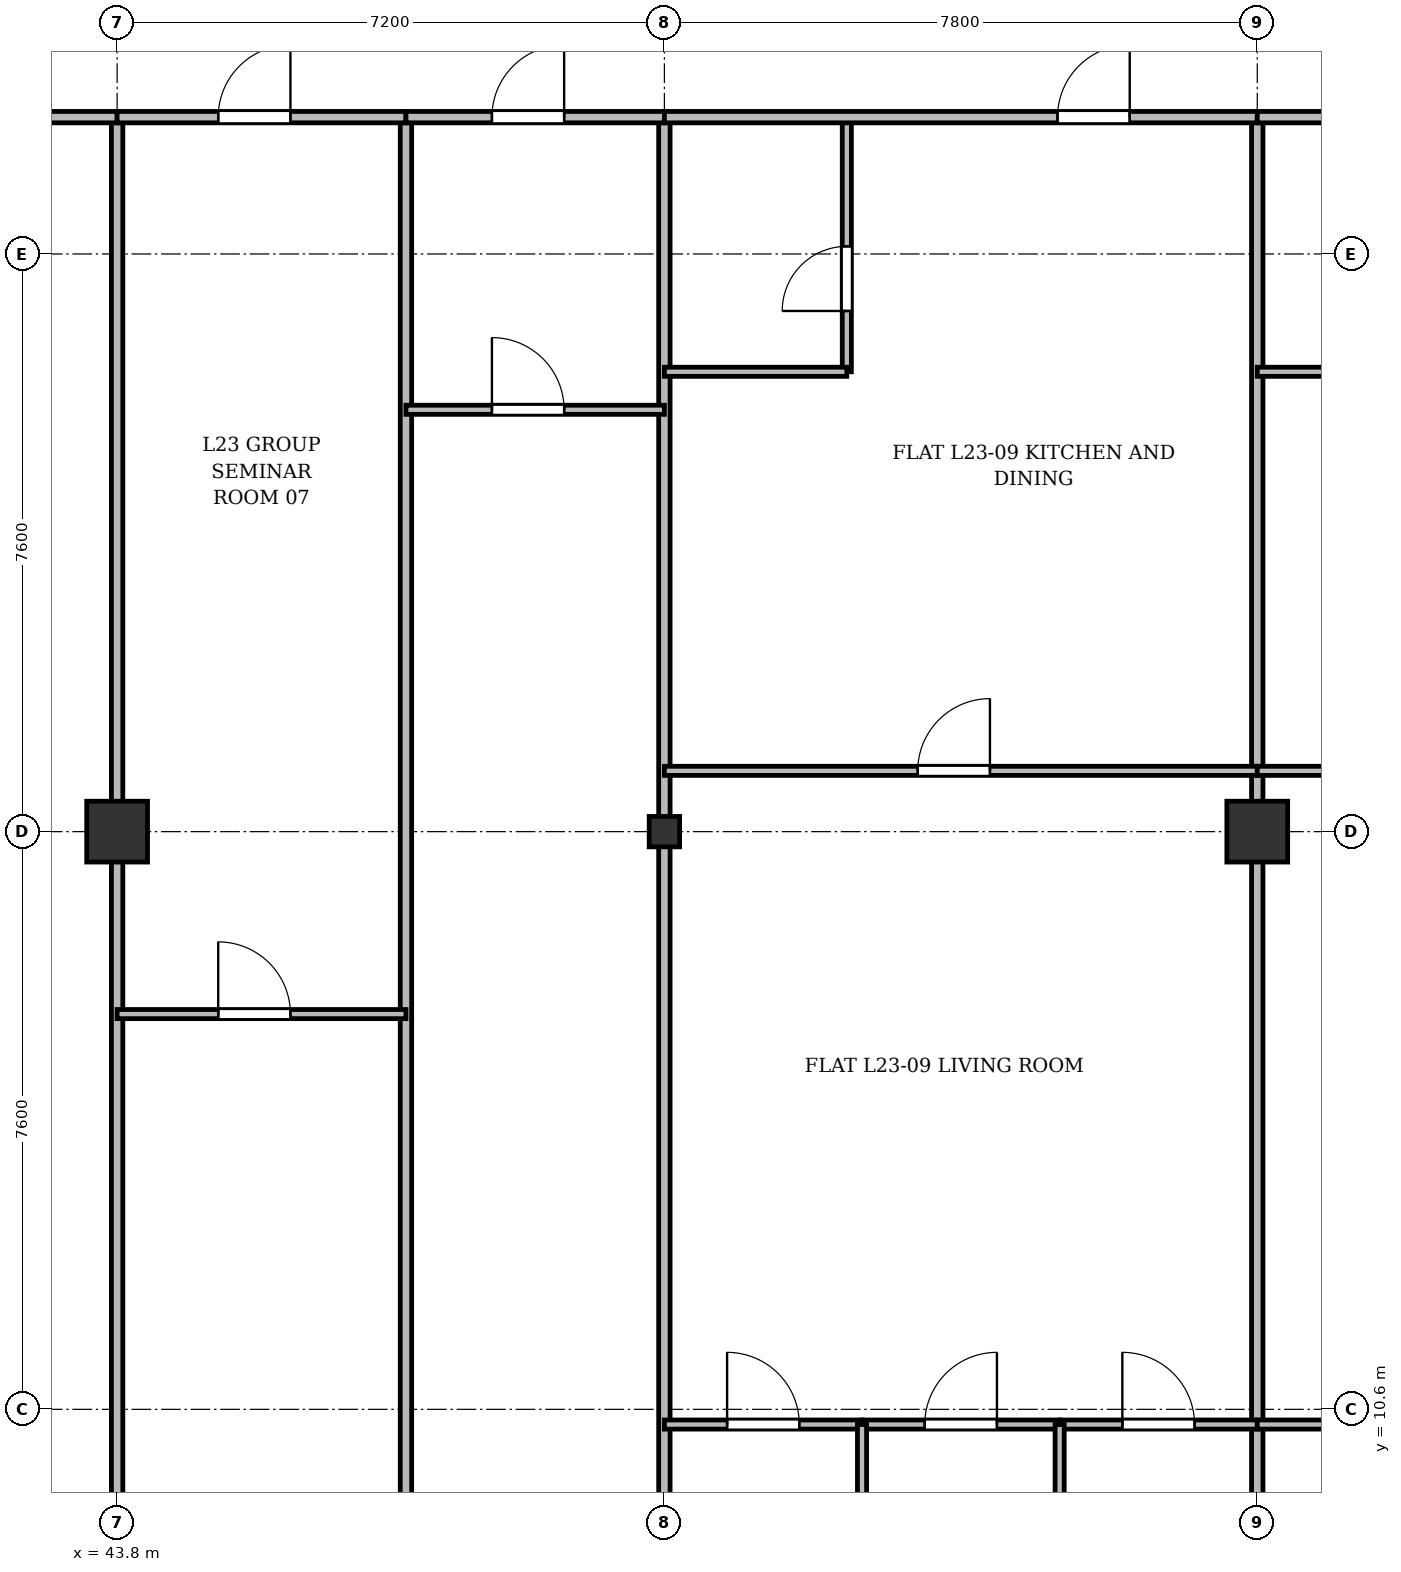
"""IFC4 building model, lengths in metres.
Left out: names, types, materials, properties, quantities, classifications, styles, units other than length and angle.
Written with IfcOpenShell. Run it as: python <this file> out.ifc"""

import sys

from ifc_helpers import new_model, si_unit, direction, frame, frame_2d, origin, origin_2d, place, context, subcontext, project, spatial, rectangle, i_section, extrude, source, transform, mapped, element, fill, save


model = new_model("IFC4")
c1 = context("Model", 3, precision=1e-05, world=origin(), true_north=direction((0.0, 1.0)))
c2 = subcontext(c1, "Body", "Model", "MODEL_VIEW")
j1 = project(units=[si_unit("LENGTHUNIT", "METRE"), si_unit("PLANEANGLEUNIT", "RADIAN")], contexts=[c1])
p1 = place(None, origin())
s1 = spatial("IfcSite", under=j1, at=p1, CompositionType="ELEMENT")
p2 = place(p1, origin())
s2 = spatial("IfcBuilding", under=s1, at=p2, CompositionType="ELEMENT")
p3 = place(p2, frame((0.0, 0.0, 92.5)))
s3 = spatial("IfcBuildingStorey", under=s2, at=p3, CompositionType="ELEMENT", Elevation=92.5)
m1 = source(origin(), c2, "Body", "SweptSolid", [
    extrude(rectangle(XDim=0.8, YDim=0.8, at=origin_2d()), origin(), (0.0, 0.0, 1.0), 3.6),
])
p4 = place(p3, frame((43.8, 18.2, 0.0), z_axis=(0.0, 0.0, 1.0), x_axis=(1.0, 0.0, 0.0)))
e1 = element("IfcColumn", 1, at=p4, inside=s3, PredefinedType="COLUMN", context=c2, shape_type="MappedRepresentation", body=[
    mapped(m1, transform((0.0, 0.0, 0.0), x_axis=(1.0, 0.0, 0.0), y_axis=(0.0, 1.0, 0.0), z_axis=(0.0, 0.0, 1.0), scale=1.0)),
])
m2 = source(origin(), c2, "Body", "SweptSolid", [
    extrude(i_section(OverallWidth=0.4, OverallDepth=0.4, WebThickness=0.022, FlangeThickness=0.035, at=origin_2d()), origin(), (0.0, 0.0, 1.0), 3.6),
])
p5 = place(p3, frame((51.0, 18.2, 0.0), z_axis=(0.0, 0.0, 1.0), x_axis=(1.0, 0.0, 0.0)))
e2 = element("IfcColumn", 2, at=p5, inside=s3, PredefinedType="COLUMN", context=c2, shape_type="MappedRepresentation", body=[
    mapped(m2, transform((0.0, 0.0, 0.0), x_axis=(1.0, 0.0, 0.0), y_axis=(0.0, 1.0, 0.0), z_axis=(0.0, 0.0, 1.0), scale=1.0)),
])
p6 = place(p3, frame((58.8, 18.2, 0.0), z_axis=(0.0, 0.0, 1.0), x_axis=(1.0, 0.0, 0.0)))
e3 = element("IfcColumn", 3, at=p6, inside=s3, PredefinedType="COLUMN", context=c2, shape_type="MappedRepresentation", body=[
    mapped(m1, transform((0.0, 0.0, 0.0), x_axis=(1.0, 0.0, 0.0), y_axis=(0.0, 1.0, 0.0), z_axis=(0.0, 0.0, 1.0), scale=1.0)),
])
p7 = place(p3, frame((43.8, 3.145, 0.0), z_axis=(0.0, 0.0, 1.0), x_axis=(0.0, 1.0, 0.0)))
e4 = element("IfcWall", 4, at=p7, inside=s3, PredefinedType="PARTITIONING", context=c2, shape_type="SweptSolid", body=[
    extrude(rectangle(XDim=24.455, YDim=0.15, at=frame_2d((12.228, 0.0))), origin(), (0.0, 0.0, 1.0), 2.84),
])
p8 = place(p3, frame((47.6, 3.145, 0.0), z_axis=(0.0, 0.0, 1.0), x_axis=(0.0, 1.0, 0.0)))
e5 = element("IfcWall", 5, at=p8, inside=s3, PredefinedType="PARTITIONING", context=c2, shape_type="SweptSolid", body=[
    extrude(rectangle(XDim=24.455, YDim=0.15, at=frame_2d((12.228, 0.0))), origin(), (0.0, 0.0, 1.0), 2.752),
])
for number, where, z_axis, x_axis in (
    (6, (51.0, 3.145, 0.0), (0.0, 0.0, 1.0), (0.0, 1.0, 0.0)),
    (7, (58.8, 3.145, 0.0), (0.0, 0.0, 1.0), (0.0, 1.0, 0.0)),
):
    element("IfcWall", number, at=place(p3, frame(where, z_axis=z_axis, x_axis=x_axis)), inside=s3, PredefinedType="PARTITIONING", context=c2, shape_type="SweptSolid", body=[
        extrude(rectangle(XDim=24.455, YDim=0.15, at=frame_2d((12.228, 0.0))), origin(), (0.0, 0.0, 1.0), 2.84),
    ])
p9 = place(p3, frame((30.6, 27.6, 0.0), z_axis=(0.0, 0.0, 1.0), x_axis=(1.0, 0.0, 0.0)))
e8 = element("IfcWall", 8, at=p9, inside=s3, PredefinedType="PARTITIONING", context=c2, shape_type="SweptSolid", body=[
    extrude(rectangle(XDim=13.2, YDim=0.15, at=frame_2d((6.6, 0.0))), origin(), (0.0, 0.0, 1.0), 2.84),
])
p10 = place(p9, frame((5.8, 0.0, 0.0)))
e9 = element("IfcOpeningElement", 9, at=p10, cuts=e8, PredefinedType="OPENING", context=c2, shape_type="SweptSolid", body=[
    extrude(rectangle(XDim=1.6, YDim=2.2, at=frame_2d((0.8, 1.1))), frame((0.0, 0.085, 0.0), z_axis=(0.0, -1.0, 0.0), x_axis=(1.0, 0.0, 0.0)), (0.0, 0.0, 1.0), 0.17),
])
p11 = place(p3, frame((43.8, 27.6, 0.0), z_axis=(0.0, 0.0, 1.0), x_axis=(1.0, 0.0, 0.0)))
e10 = element("IfcWall", 10, at=p11, inside=s3, PredefinedType="PARTITIONING", context=c2, shape_type="SweptSolid", body=[
    extrude(rectangle(XDim=3.8, YDim=0.15, at=frame_2d((1.9, 0.0))), origin(), (0.0, 0.0, 1.0), 2.84),
])
p12 = place(p11, frame((1.33, 0.0, 0.0)))
e11 = element("IfcOpeningElement", 11, at=p12, cuts=e10, PredefinedType="OPENING", context=c2, shape_type="SweptSolid", body=[
    extrude(rectangle(XDim=0.95, YDim=2.15, at=frame_2d((0.475, 1.075))), frame((0.0, 0.085, 0.0), z_axis=(0.0, -1.0, 0.0), x_axis=(1.0, 0.0, 0.0)), (0.0, 0.0, 1.0), 0.17),
])
p13 = place(p3, frame((43.8, 15.8, 0.0), z_axis=(0.0, 0.0, 1.0), x_axis=(1.0, 0.0, 0.0)))
e12 = element("IfcWall", 12, at=p13, inside=s3, PredefinedType="PARTITIONING", context=c2, shape_type="SweptSolid", body=[
    extrude(rectangle(XDim=3.8, YDim=0.12, at=frame_2d((1.9, 0.0))), origin(), (0.0, 0.0, 1.0), 2.84),
])
p14 = place(p13, frame((1.33, 0.0, 0.0)))
e13 = element("IfcOpeningElement", 13, at=p14, cuts=e12, PredefinedType="OPENING", context=c2, shape_type="SweptSolid", body=[
    extrude(rectangle(XDim=0.95, YDim=2.15, at=frame_2d((0.475, 1.075))), frame((0.0, 0.07, 0.0), z_axis=(0.0, -1.0, 0.0), x_axis=(1.0, 0.0, 0.0)), (0.0, 0.0, 1.0), 0.14),
])
p15 = place(p3, frame((47.6, 27.6, 0.0), z_axis=(0.0, 0.0, 1.0), x_axis=(1.0, 0.0, 0.0)))
e14 = element("IfcWall", 14, at=p15, inside=s3, PredefinedType="PARTITIONING", context=c2, shape_type="SweptSolid", body=[
    extrude(rectangle(XDim=3.4, YDim=0.15, at=frame_2d((1.7, 0.0))), origin(), (0.0, 0.0, 1.0), 2.84),
])
p16 = place(p15, frame((1.131, 0.0, 0.0)))
e15 = element("IfcOpeningElement", 15, at=p16, cuts=e14, PredefinedType="OPENING", context=c2, shape_type="SweptSolid", body=[
    extrude(rectangle(XDim=0.95, YDim=2.15, at=frame_2d((0.475, 1.075))), frame((0.0, 0.085, 0.0), z_axis=(0.0, -1.0, 0.0), x_axis=(1.0, 0.0, 0.0)), (0.0, 0.0, 1.0), 0.17),
])
p17 = place(p3, frame((47.6, 23.75, 0.0), z_axis=(0.0, 0.0, 1.0), x_axis=(1.0, 0.0, 0.0)))
e16 = element("IfcWall", 16, at=p17, inside=s3, PredefinedType="PARTITIONING", context=c2, shape_type="SweptSolid", body=[
    extrude(rectangle(XDim=3.4, YDim=0.12, at=frame_2d((1.7, 0.0))), origin(), (0.0, 0.0, 1.0), 2.84),
])
p18 = place(p17, frame((1.131, 0.0, 0.0)))
e17 = element("IfcOpeningElement", 17, at=p18, cuts=e16, PredefinedType="OPENING", context=c2, shape_type="SweptSolid", body=[
    extrude(rectangle(XDim=0.95, YDim=2.15, at=frame_2d((0.475, 1.075))), frame((0.0, 0.07, 0.0), z_axis=(0.0, -1.0, 0.0), x_axis=(1.0, 0.0, 0.0)), (0.0, 0.0, 1.0), 0.14),
])
p19 = place(p3, frame((51.0, 19.0, 0.0), z_axis=(0.0, 0.0, 1.0), x_axis=(1.0, 0.0, 0.0)))
e18 = element("IfcWall", 18, at=p19, inside=s3, PredefinedType="PARTITIONING", context=c2, shape_type="SweptSolid", body=[
    extrude(rectangle(XDim=7.8, YDim=0.12, at=frame_2d((3.9, 0.0))), origin(), (0.0, 0.0, 1.0), 2.84),
])
p20 = place(p19, frame((3.333, 0.0, 0.0)))
e19 = element("IfcOpeningElement", 19, at=p20, cuts=e18, PredefinedType="OPENING", context=c2, shape_type="SweptSolid", body=[
    extrude(rectangle(XDim=0.95, YDim=2.15, at=frame_2d((0.475, 1.075))), frame((0.0, 0.07, 0.0), z_axis=(0.0, -1.0, 0.0), x_axis=(1.0, 0.0, 0.0)), (0.0, 0.0, 1.0), 0.14),
])
p21 = place(p3, frame((53.4, 24.25, 0.0), z_axis=(0.0, 0.0, 1.0), x_axis=(0.0, 1.0, 0.0)))
e20 = element("IfcWall", 20, at=p21, inside=s3, PredefinedType="PARTITIONING", context=c2, shape_type="SweptSolid", body=[
    extrude(rectangle(XDim=3.35, YDim=0.12, at=frame_2d((1.675, 0.0))), origin(), (0.0, 0.0, 1.0), 2.99),
])
p22 = place(p21, frame((0.8, 0.0, 0.0)))
e21 = element("IfcOpeningElement", 21, at=p22, cuts=e20, PredefinedType="OPENING", context=c2, shape_type="SweptSolid", body=[
    extrude(rectangle(XDim=0.85, YDim=2.1, at=frame_2d((0.425, 1.05))), frame((0.0, 0.07, 0.0), z_axis=(0.0, -1.0, 0.0), x_axis=(1.0, 0.0, 0.0)), (0.0, 0.0, 1.0), 0.14),
])
p23 = place(p3, frame((51.0, 24.25, 0.0), z_axis=(0.0, 0.0, 1.0), x_axis=(1.0, 0.0, 0.0)))
e22 = element("IfcWall", 22, at=p23, inside=s3, PredefinedType="PARTITIONING", context=c2, shape_type="SweptSolid", body=[
    extrude(rectangle(XDim=2.4, YDim=0.12, at=frame_2d((1.2, 0.0))), origin(), (0.0, 0.0, 1.0), 2.84),
])
p24 = place(p3, frame((51.0, 27.6, 0.0), z_axis=(0.0, 0.0, 1.0), x_axis=(1.0, 0.0, 0.0)))
e23 = element("IfcWall", 23, at=p24, inside=s3, PredefinedType="PARTITIONING", context=c2, shape_type="SweptSolid", body=[
    extrude(rectangle(XDim=7.8, YDim=0.15, at=frame_2d((3.9, 0.0))), origin(), (0.0, 0.0, 1.0), 2.84),
])
p25 = place(p24, frame((5.172, 0.0, 0.0)))
e24 = element("IfcOpeningElement", 24, at=p25, cuts=e23, PredefinedType="OPENING", context=c2, shape_type="SweptSolid", body=[
    extrude(rectangle(XDim=0.95, YDim=2.15, at=frame_2d((0.475, 1.075))), frame((0.0, 0.085, 0.0), z_axis=(0.0, -1.0, 0.0), x_axis=(1.0, 0.0, 0.0)), (0.0, 0.0, 1.0), 0.17),
])
p26 = place(p3, frame((51.0, 10.4, 0.0), z_axis=(0.0, 0.0, 1.0), x_axis=(1.0, 0.0, 0.0)))
e25 = element("IfcWall", 25, at=p26, inside=s3, PredefinedType="PARTITIONING", context=c2, shape_type="SweptSolid", body=[
    extrude(rectangle(XDim=2.6, YDim=0.12, at=frame_2d((1.3, 0.0))), origin(), (0.0, 0.0, 1.0), 2.84),
])
p27 = place(p26, frame((0.825, 0.0, 0.0)))
e26 = element("IfcOpeningElement", 26, at=p27, cuts=e25, PredefinedType="OPENING", context=c2, shape_type="SweptSolid", body=[
    extrude(rectangle(XDim=0.95, YDim=2.15, at=frame_2d((0.475, 1.075))), frame((0.0, 0.07, 0.0), z_axis=(0.0, -1.0, 0.0), x_axis=(1.0, 0.0, 0.0)), (0.0, 0.0, 1.0), 0.14),
])
p28 = place(p3, frame((53.6, 10.4, 0.0), z_axis=(0.0, 0.0, 1.0), x_axis=(1.0, 0.0, 0.0)))
e27 = element("IfcWall", 27, at=p28, inside=s3, PredefinedType="PARTITIONING", context=c2, shape_type="SweptSolid", body=[
    extrude(rectangle(XDim=2.6, YDim=0.12, at=frame_2d((1.3, 0.0))), origin(), (0.0, 0.0, 1.0), 3.34),
])
p29 = place(p28, frame((0.825, 0.0, 0.0)))
e28 = element("IfcOpeningElement", 28, at=p29, cuts=e27, PredefinedType="OPENING", context=c2, shape_type="SweptSolid", body=[
    extrude(rectangle(XDim=0.95, YDim=2.15, at=frame_2d((0.475, 1.075))), frame((0.0, 0.07, 0.0), z_axis=(0.0, -1.0, 0.0), x_axis=(1.0, 0.0, 0.0)), (0.0, 0.0, 1.0), 0.14),
])
p30 = place(p3, frame((53.6, 3.145, 0.0), z_axis=(0.0, 0.0, 1.0), x_axis=(0.0, 1.0, 0.0)))
e29 = element("IfcWall", 29, at=p30, inside=s3, PredefinedType="PARTITIONING", context=c2, shape_type="SweptSolid", body=[
    extrude(rectangle(XDim=7.255, YDim=0.12, at=frame_2d((3.627, 0.0))), origin(), (0.0, 0.0, 1.0), 2.752),
])
p31 = place(p3, frame((56.2, 10.4, 0.0), z_axis=(0.0, 0.0, 1.0), x_axis=(1.0, 0.0, 0.0)))
e30 = element("IfcWall", 30, at=p31, inside=s3, PredefinedType="PARTITIONING", context=c2, shape_type="SweptSolid", body=[
    extrude(rectangle(XDim=2.6, YDim=0.12, at=frame_2d((1.3, 0.0))), origin(), (0.0, 0.0, 1.0), 2.84),
])
p32 = place(p31, frame((0.825, 0.0, 0.0)))
e31 = element("IfcOpeningElement", 31, at=p32, cuts=e30, PredefinedType="OPENING", context=c2, shape_type="SweptSolid", body=[
    extrude(rectangle(XDim=0.95, YDim=2.15, at=frame_2d((0.475, 1.075))), frame((0.0, 0.07, 0.0), z_axis=(0.0, -1.0, 0.0), x_axis=(1.0, 0.0, 0.0)), (0.0, 0.0, 1.0), 0.14),
])
p33 = place(p3, frame((56.2, 3.145, 0.0), z_axis=(0.0, 0.0, 1.0), x_axis=(0.0, 1.0, 0.0)))
e32 = element("IfcWall", 32, at=p33, inside=s3, PredefinedType="PARTITIONING", context=c2, shape_type="SweptSolid", body=[
    extrude(rectangle(XDim=7.255, YDim=0.12, at=frame_2d((3.627, 0.0))), origin(), (0.0, 0.0, 1.0), 2.752),
])
p34 = place(p3, frame((58.8, 19.0, 0.0), z_axis=(0.0, 0.0, 1.0), x_axis=(1.0, 0.0, 0.0)))
e33 = element("IfcWall", 33, at=p34, inside=s3, PredefinedType="PARTITIONING", context=c2, shape_type="SweptSolid", body=[
    extrude(rectangle(XDim=6.8, YDim=0.12, at=frame_2d((3.4, 0.0))), origin(), (0.0, 0.0, 1.0), 2.84),
])
p35 = place(p34, frame((2.925, 0.0, 0.0)))
e34 = element("IfcOpeningElement", 34, at=p35, cuts=e33, PredefinedType="OPENING", context=c2, shape_type="SweptSolid", body=[
    extrude(rectangle(XDim=0.95, YDim=2.15, at=frame_2d((0.475, 1.075))), frame((0.0, 0.07, 0.0), z_axis=(0.0, -1.0, 0.0), x_axis=(1.0, 0.0, 0.0)), (0.0, 0.0, 1.0), 0.14),
])
p36 = place(p3, frame((58.8, 24.25, 0.0), z_axis=(0.0, 0.0, 1.0), x_axis=(1.0, 0.0, 0.0)))
e35 = element("IfcWall", 35, at=p36, inside=s3, PredefinedType="PARTITIONING", context=c2, shape_type="SweptSolid", body=[
    extrude(rectangle(XDim=2.362, YDim=0.12, at=frame_2d((1.181, 0.0))), origin(), (0.0, 0.0, 1.0), 2.84),
])
p37 = place(p3, frame((58.8, 27.6, 0.0), z_axis=(0.0, 0.0, 1.0), x_axis=(1.0, 0.0, 0.0)))
e36 = element("IfcWall", 36, at=p37, inside=s3, PredefinedType="PARTITIONING", context=c2, shape_type="SweptSolid", body=[
    extrude(rectangle(XDim=6.8, YDim=0.15, at=frame_2d((3.4, 0.0))), origin(), (0.0, 0.0, 1.0), 2.84),
])
p38 = place(p37, frame((4.49, 0.0, 0.0)))
e37 = element("IfcOpeningElement", 37, at=p38, cuts=e36, PredefinedType="OPENING", context=c2, shape_type="SweptSolid", body=[
    extrude(rectangle(XDim=0.95, YDim=2.15, at=frame_2d((0.475, 1.075))), frame((0.0, 0.085, 0.0), z_axis=(0.0, -1.0, 0.0), x_axis=(1.0, 0.0, 0.0)), (0.0, 0.0, 1.0), 0.17),
])
p39 = place(p3, frame((58.8, 10.4, 0.0), z_axis=(0.0, 0.0, 1.0), x_axis=(1.0, 0.0, 0.0)))
e38 = element("IfcWall", 38, at=p39, inside=s3, PredefinedType="PARTITIONING", context=c2, shape_type="SweptSolid", body=[
    extrude(rectangle(XDim=3.4, YDim=0.12, at=frame_2d((1.7, 0.0))), origin(), (0.0, 0.0, 1.0), 2.84),
])
p40 = place(p39, frame((1.131, 0.0, 0.0)))
e39 = element("IfcOpeningElement", 39, at=p40, cuts=e38, PredefinedType="OPENING", context=c2, shape_type="SweptSolid", body=[
    extrude(rectangle(XDim=0.95, YDim=2.15, at=frame_2d((0.475, 1.075))), frame((0.0, 0.07, 0.0), z_axis=(0.0, -1.0, 0.0), x_axis=(1.0, 0.0, 0.0)), (0.0, 0.0, 1.0), 0.14),
])
m3 = source(origin(), c2, "Body", "SweptSolid", [
    extrude(rectangle(XDim=0.95, YDim=2.15, at=frame_2d((0.475, 1.075))), frame((0.0, 0.025, 0.0), z_axis=(0.0, -1.0, 0.0), x_axis=(1.0, 0.0, 0.0)), (0.0, 0.0, 1.0), 0.05),
])
p41 = place(p12, origin())
e40 = element("IfcDoor", 40, at=p41, inside=s3, OperationType="SINGLE_SWING_RIGHT", PredefinedType="DOOR", context=c2, shape_type="MappedRepresentation", body=[
    mapped(m3, transform((0.0, 0.0, 0.0), x_axis=(1.0, 0.0, 0.0), y_axis=(0.0, 1.0, 0.0), z_axis=(0.0, 0.0, 1.0), scale=1.0)),
])
fill(e11, e40)
p42 = place(p14, origin())
e41 = element("IfcDoor", 41, at=p42, inside=s3, OperationType="SINGLE_SWING_LEFT", PredefinedType="DOOR", context=c2, shape_type="MappedRepresentation", body=[
    mapped(m3, transform((0.0, 0.0, 0.0), x_axis=(1.0, 0.0, 0.0), y_axis=(0.0, 1.0, 0.0), z_axis=(0.0, 0.0, 1.0), scale=1.0)),
])
fill(e13, e41)
p43 = place(p16, origin())
e42 = element("IfcDoor", 42, at=p43, inside=s3, OperationType="SINGLE_SWING_RIGHT", PredefinedType="DOOR", context=c2, shape_type="MappedRepresentation", body=[
    mapped(m3, transform((0.0, 0.0, 0.0), x_axis=(1.0, 0.0, 0.0), y_axis=(0.0, 1.0, 0.0), z_axis=(0.0, 0.0, 1.0), scale=1.0)),
])
fill(e15, e42)
p44 = place(p18, origin())
e43 = element("IfcDoor", 43, at=p44, inside=s3, OperationType="SINGLE_SWING_LEFT", PredefinedType="DOOR", context=c2, shape_type="MappedRepresentation", body=[
    mapped(m3, transform((0.0, 0.0, 0.0), x_axis=(1.0, 0.0, 0.0), y_axis=(0.0, 1.0, 0.0), z_axis=(0.0, 0.0, 1.0), scale=1.0)),
])
fill(e17, e43)
p45 = place(p20, origin())
e44 = element("IfcDoor", 44, at=p45, inside=s3, OperationType="SINGLE_SWING_RIGHT", PredefinedType="DOOR", context=c2, shape_type="MappedRepresentation", body=[
    mapped(m3, transform((0.0, 0.0, 0.0), x_axis=(1.0, 0.0, 0.0), y_axis=(0.0, 1.0, 0.0), z_axis=(0.0, 0.0, 1.0), scale=1.0)),
])
fill(e19, e44)
m4 = source(origin(), c2, "Body", "SweptSolid", [
    extrude(rectangle(XDim=0.85, YDim=2.1, at=frame_2d((0.425, 1.05))), frame((0.0, 0.025, 0.0), z_axis=(0.0, -1.0, 0.0), x_axis=(1.0, 0.0, 0.0)), (0.0, 0.0, 1.0), 0.05),
])
p46 = place(p22, origin())
e45 = element("IfcDoor", 45, at=p46, inside=s3, OperationType="SINGLE_SWING_LEFT", PredefinedType="DOOR", context=c2, shape_type="MappedRepresentation", body=[
    mapped(m4, transform((0.0, 0.0, 0.0), x_axis=(1.0, 0.0, 0.0), y_axis=(0.0, 1.0, 0.0), z_axis=(0.0, 0.0, 1.0), scale=1.0)),
])
fill(e21, e45)
p47 = place(p25, origin())
e46 = element("IfcDoor", 46, at=p47, inside=s3, OperationType="SINGLE_SWING_RIGHT", PredefinedType="DOOR", context=c2, shape_type="MappedRepresentation", body=[
    mapped(m3, transform((0.0, 0.0, 0.0), x_axis=(1.0, 0.0, 0.0), y_axis=(0.0, 1.0, 0.0), z_axis=(0.0, 0.0, 1.0), scale=1.0)),
])
fill(e24, e46)
p48 = place(p27, origin())
e47 = element("IfcDoor", 47, at=p48, inside=s3, OperationType="SINGLE_SWING_LEFT", PredefinedType="DOOR", context=c2, shape_type="MappedRepresentation", body=[
    mapped(m3, transform((0.0, 0.0, 0.0), x_axis=(1.0, 0.0, 0.0), y_axis=(0.0, 1.0, 0.0), z_axis=(0.0, 0.0, 1.0), scale=1.0)),
])
fill(e26, e47)
p49 = place(p29, origin())
e48 = element("IfcDoor", 48, at=p49, inside=s3, OperationType="SINGLE_SWING_RIGHT", PredefinedType="DOOR", context=c2, shape_type="MappedRepresentation", body=[
    mapped(m3, transform((0.0, 0.0, 0.0), x_axis=(1.0, 0.0, 0.0), y_axis=(0.0, 1.0, 0.0), z_axis=(0.0, 0.0, 1.0), scale=1.0)),
])
fill(e28, e48)
p50 = place(p32, origin())
e49 = element("IfcDoor", 49, at=p50, inside=s3, OperationType="SINGLE_SWING_LEFT", PredefinedType="DOOR", context=c2, shape_type="MappedRepresentation", body=[
    mapped(m3, transform((0.0, 0.0, 0.0), x_axis=(1.0, 0.0, 0.0), y_axis=(0.0, 1.0, 0.0), z_axis=(0.0, 0.0, 1.0), scale=1.0)),
])
fill(e31, e49)
save(model, sys.argv[1])
